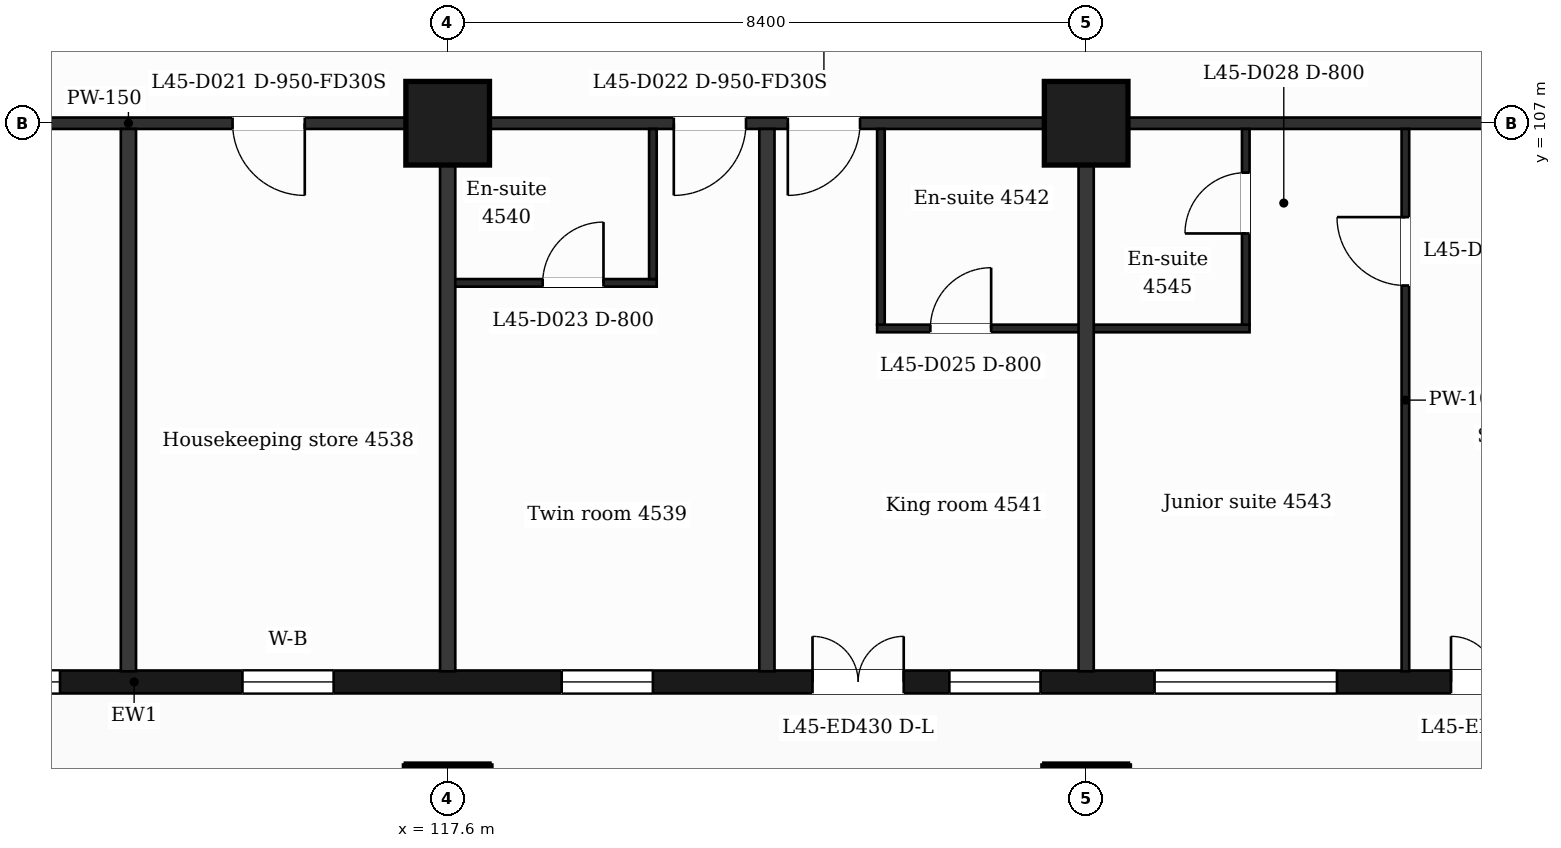
"""IFC4 building model, lengths in metres.
Left out: names, types, materials, properties, quantities, classifications, styles, units other than length and angle.
Written with IfcOpenShell. Run it as: python <this file> out.ifc"""

import sys

from ifc_helpers import new_model, si_unit, direction, frame, frame_2d, origin, origin_2d, place, context, subcontext, project, spatial, rectangle, extrude, element, fill, save


model = new_model("IFC4")
c1 = context("Model", 3, precision=1e-05, world=origin(), true_north=direction((0.0, 1.0)))
c2 = subcontext(c1, "Body", "Model", "MODEL_VIEW")
j1 = project(units=[si_unit("LENGTHUNIT", "METRE"), si_unit("PLANEANGLEUNIT", "RADIAN")], contexts=[c1])
p1 = place(None, origin())
s1 = spatial("IfcSite", under=j1, at=p1, CompositionType="ELEMENT")
p2 = place(p1, origin())
s2 = spatial("IfcBuilding", under=s1, at=p2, CompositionType="ELEMENT")
p3 = place(p2, frame((0.0, 0.0, 188.5)))
s3 = spatial("IfcBuildingStorey", under=s2, at=p3, CompositionType="ELEMENT", Elevation=188.5)
for number, where, z_axis, x_axis in (
    (1, (117.6, 98.0, 0.0), (0.0, 0.0, 1.0), (1.0, 0.0, 0.0)),
    (2, (126.0, 98.0, 0.0), (0.0, 0.0, 1.0), (1.0, 0.0, 0.0)),
    (3, (117.6, 107.0, 0.0), (0.0, 0.0, 1.0), (1.0, 0.0, 0.0)),
    (4, (126.0, 107.0, 0.0), (0.0, 0.0, 1.0), (1.0, 0.0, 0.0)),
):
    element("IfcColumn", number, at=place(p3, frame(where, z_axis=z_axis, x_axis=x_axis)), inside=s3, PredefinedType="COLUMN", context=c2, shape_type="SweptSolid", body=[
        extrude(rectangle(XDim=1.1, YDim=1.1, at=origin_2d()), origin(), (0.0, 0.0, 1.0), 3.7),
    ])
p4 = place(p3, frame((89.85, 99.65, 0.0), z_axis=(0.0, 0.0, 1.0), x_axis=(1.0, 0.0, 0.0)))
e5 = element("IfcWall", 5, at=p4, inside=s3, PredefinedType="SOLIDWALL", context=c2, shape_type="SweptSolid", body=[
    extrude(rectangle(XDim=47.25, YDim=0.3, at=frame_2d((23.625, 0.0))), origin(), (0.0, 0.0, 1.0), 3.25),
])
p5 = place(p4, frame((0.725, 0.0, 0.9)))
e6 = element("IfcOpeningElement", 6, at=p5, cuts=e5, PredefinedType="OPENING", context=c2, shape_type="SweptSolid", body=[
    extrude(rectangle(XDim=1.2, YDim=2.1, at=frame_2d((0.6, 1.05))), frame((0.0, 0.16, 0.0), z_axis=(0.0, -1.0, 0.0), x_axis=(1.0, 0.0, 0.0)), (0.0, 0.0, 1.0), 0.32),
])
p6 = place(p4, frame((3.45, 0.0, 0.9)))
e7 = element("IfcOpeningElement", 7, at=p6, cuts=e5, PredefinedType="OPENING", context=c2, shape_type="SweptSolid", body=[
    extrude(rectangle(XDim=2.4, YDim=2.1, at=frame_2d((1.2, 1.05))), frame((0.0, 0.16, 0.0), z_axis=(0.0, -1.0, 0.0), x_axis=(1.0, 0.0, 0.0)), (0.0, 0.0, 1.0), 0.32),
])
p7 = place(p4, frame((7.65, 0.0, 0.9)))
e8 = element("IfcOpeningElement", 8, at=p7, cuts=e5, PredefinedType="OPENING", context=c2, shape_type="SweptSolid", body=[
    extrude(rectangle(XDim=2.4, YDim=2.1, at=frame_2d((1.2, 1.05))), frame((0.0, 0.16, 0.0), z_axis=(0.0, -1.0, 0.0), x_axis=(1.0, 0.0, 0.0)), (0.0, 0.0, 1.0), 0.32),
])
p8 = place(p4, frame((11.85, 0.0, 0.9)))
e9 = element("IfcOpeningElement", 9, at=p8, cuts=e5, PredefinedType="OPENING", context=c2, shape_type="SweptSolid", body=[
    extrude(rectangle(XDim=2.4, YDim=2.1, at=frame_2d((1.2, 1.05))), frame((0.0, 0.16, 0.0), z_axis=(0.0, -1.0, 0.0), x_axis=(1.0, 0.0, 0.0)), (0.0, 0.0, 1.0), 0.32),
])
p9 = place(p4, frame((16.05, 0.0, 0.9)))
e10 = element("IfcOpeningElement", 10, at=p9, cuts=e5, PredefinedType="OPENING", context=c2, shape_type="SweptSolid", body=[
    extrude(rectangle(XDim=2.4, YDim=2.1, at=frame_2d((1.2, 1.05))), frame((0.0, 0.16, 0.0), z_axis=(0.0, -1.0, 0.0), x_axis=(1.0, 0.0, 0.0)), (0.0, 0.0, 1.0), 0.32),
])
p10 = place(p4, frame((20.25, 0.0, 0.9)))
e11 = element("IfcOpeningElement", 11, at=p10, cuts=e5, PredefinedType="OPENING", context=c2, shape_type="SweptSolid", body=[
    extrude(rectangle(XDim=2.4, YDim=2.1, at=frame_2d((1.2, 1.05))), frame((0.0, 0.16, 0.0), z_axis=(0.0, -1.0, 0.0), x_axis=(1.0, 0.0, 0.0)), (0.0, 0.0, 1.0), 0.32),
])
p11 = place(p4, frame((25.05, 0.0, 0.9)))
e12 = element("IfcOpeningElement", 12, at=p11, cuts=e5, PredefinedType="OPENING", context=c2, shape_type="SweptSolid", body=[
    extrude(rectangle(XDim=1.2, YDim=2.1, at=frame_2d((0.6, 1.05))), frame((0.0, 0.16, 0.0), z_axis=(0.0, -1.0, 0.0), x_axis=(1.0, 0.0, 0.0)), (0.0, 0.0, 1.0), 0.32),
])
p12 = place(p4, frame((29.25, 0.0, 0.9)))
e13 = element("IfcOpeningElement", 13, at=p12, cuts=e5, PredefinedType="OPENING", context=c2, shape_type="SweptSolid", body=[
    extrude(rectangle(XDim=1.2, YDim=2.1, at=frame_2d((0.6, 1.05))), frame((0.0, 0.16, 0.0), z_axis=(0.0, -1.0, 0.0), x_axis=(1.0, 0.0, 0.0)), (0.0, 0.0, 1.0), 0.32),
])
p13 = place(p4, frame((32.55, 0.0, 0.0)))
e14 = element("IfcOpeningElement", 14, at=p13, cuts=e5, PredefinedType="OPENING", context=c2, shape_type="SweptSolid", body=[
    extrude(rectangle(XDim=1.2, YDim=2.4, at=frame_2d((0.6, 1.2))), frame((0.0, 0.16, 0.0), z_axis=(0.0, -1.0, 0.0), x_axis=(1.0, 0.0, 0.0)), (0.0, 0.0, 1.0), 0.32),
])
p14 = place(p4, frame((34.35, 0.0, 0.9)))
e15 = element("IfcOpeningElement", 15, at=p14, cuts=e5, PredefinedType="OPENING", context=c2, shape_type="SweptSolid", body=[
    extrude(rectangle(XDim=1.2, YDim=2.1, at=frame_2d((0.6, 1.05))), frame((0.0, 0.16, 0.0), z_axis=(0.0, -1.0, 0.0), x_axis=(1.0, 0.0, 0.0)), (0.0, 0.0, 1.0), 0.32),
])
p15 = place(p4, frame((37.05, 0.0, 0.9)))
e16 = element("IfcOpeningElement", 16, at=p15, cuts=e5, PredefinedType="OPENING", context=c2, shape_type="SweptSolid", body=[
    extrude(rectangle(XDim=2.4, YDim=2.1, at=frame_2d((1.2, 1.05))), frame((0.0, 0.16, 0.0), z_axis=(0.0, -1.0, 0.0), x_axis=(1.0, 0.0, 0.0)), (0.0, 0.0, 1.0), 0.32),
])
p16 = place(p4, frame((40.95, 0.0, 0.0)))
e17 = element("IfcOpeningElement", 17, at=p16, cuts=e5, PredefinedType="OPENING", context=c2, shape_type="SweptSolid", body=[
    extrude(rectangle(XDim=1.2, YDim=2.4, at=frame_2d((0.6, 1.2))), frame((0.0, 0.16, 0.0), z_axis=(0.0, -1.0, 0.0), x_axis=(1.0, 0.0, 0.0)), (0.0, 0.0, 1.0), 0.32),
])
p17 = place(p4, frame((42.75, 0.0, 0.9)))
e18 = element("IfcOpeningElement", 18, at=p17, cuts=e5, PredefinedType="OPENING", context=c2, shape_type="SweptSolid", body=[
    extrude(rectangle(XDim=1.2, YDim=2.1, at=frame_2d((0.6, 1.05))), frame((0.0, 0.16, 0.0), z_axis=(0.0, -1.0, 0.0), x_axis=(1.0, 0.0, 0.0)), (0.0, 0.0, 1.0), 0.32),
])
p18 = place(p4, frame((45.25, 0.0, 0.9)))
e19 = element("IfcOpeningElement", 19, at=p18, cuts=e5, PredefinedType="OPENING", context=c2, shape_type="SweptSolid", body=[
    extrude(rectangle(XDim=1.2, YDim=2.1, at=frame_2d((0.6, 1.05))), frame((0.0, 0.16, 0.0), z_axis=(0.0, -1.0, 0.0), x_axis=(1.0, 0.0, 0.0)), (0.0, 0.0, 1.0), 0.32),
])
p19 = place(p3, frame((123.25, 104.3, 0.0), z_axis=(0.0, 0.0, 1.0), x_axis=(1.0, 0.0, 0.0)))
e20 = element("IfcWall", 20, at=p19, inside=s3, PredefinedType="PARTITIONING", context=c2, shape_type="SweptSolid", body=[
    extrude(rectangle(XDim=4.9, YDim=0.1, at=frame_2d((2.45, 0.0))), origin(), (0.0, 0.0, 1.0), 3.25),
])
p20 = place(p19, frame((0.7, 0.0, 0.0)))
e21 = element("IfcOpeningElement", 21, at=p20, cuts=e20, PredefinedType="OPENING", context=c2, shape_type="SweptSolid", body=[
    extrude(rectangle(XDim=0.8, YDim=2.1, at=frame_2d((0.4, 1.05))), frame((0.0, 0.06, 0.0), z_axis=(0.0, -1.0, 0.0), x_axis=(1.0, 0.0, 0.0)), (0.0, 0.0, 1.0), 0.12),
])
p21 = place(p3, frame((117.6, 104.9, 0.0), z_axis=(0.0, 0.0, 1.0), x_axis=(1.0, 0.0, 0.0)))
e22 = element("IfcWall", 22, at=p21, inside=s3, PredefinedType="PARTITIONING", context=c2, shape_type="SweptSolid", body=[
    extrude(rectangle(XDim=2.75, YDim=0.1, at=frame_2d((1.375, 0.0))), origin(), (0.0, 0.0, 1.0), 3.25),
])
p22 = place(p21, frame((1.25, 0.0, 0.0)))
e23 = element("IfcOpeningElement", 23, at=p22, cuts=e22, PredefinedType="OPENING", context=c2, shape_type="SweptSolid", body=[
    extrude(rectangle(XDim=0.8, YDim=2.1, at=frame_2d((0.4, 1.05))), frame((0.0, 0.06, 0.0), z_axis=(0.0, -1.0, 0.0), x_axis=(1.0, 0.0, 0.0)), (0.0, 0.0, 1.0), 0.12),
])
p23 = place(p3, frame((87.018, 107.0, 0.0), z_axis=(0.0, 0.0, 1.0), x_axis=(1.0, 0.0, 0.0)))
e24 = element("IfcWall", 24, at=p23, inside=s3, PredefinedType="PARTITIONING", context=c2, shape_type="SweptSolid", body=[
    extrude(rectangle(XDim=52.765, YDim=0.15, at=frame_2d((26.382, 0.0))), origin(), (0.0, 0.0, 1.0), 3.25),
])
p24 = place(p23, frame((0.87, 0.0, 0.0)))
e25 = element("IfcOpeningElement", 25, at=p24, cuts=e24, PredefinedType="OPENING", context=c2, shape_type="SweptSolid", body=[
    extrude(rectangle(XDim=0.95, YDim=2.1, at=frame_2d((0.475, 1.05))), frame((0.0, 0.085, 0.0), z_axis=(0.0, -1.0, 0.0), x_axis=(1.0, 0.0, 0.0)), (0.0, 0.0, 1.0), 0.17),
])
p25 = place(p23, frame((10.757, 0.0, 0.0)))
e26 = element("IfcOpeningElement", 26, at=p25, cuts=e24, PredefinedType="OPENING", context=c2, shape_type="SweptSolid", body=[
    extrude(rectangle(XDim=1.0, YDim=2.1, at=frame_2d((0.5, 1.05))), frame((0.0, 0.085, 0.0), z_axis=(0.0, -1.0, 0.0), x_axis=(1.0, 0.0, 0.0)), (0.0, 0.0, 1.0), 0.17),
])
p26 = place(p23, frame((20.432, 0.0, 0.0)))
e27 = element("IfcOpeningElement", 27, at=p26, cuts=e24, PredefinedType="OPENING", context=c2, shape_type="SweptSolid", body=[
    extrude(rectangle(XDim=0.95, YDim=2.1, at=frame_2d((0.475, 1.05))), frame((0.0, 0.085, 0.0), z_axis=(0.0, -1.0, 0.0), x_axis=(1.0, 0.0, 0.0)), (0.0, 0.0, 1.0), 0.17),
])
p27 = place(p23, frame((27.752, 0.0, 0.0)))
e28 = element("IfcOpeningElement", 28, at=p27, cuts=e24, PredefinedType="OPENING", context=c2, shape_type="SweptSolid", body=[
    extrude(rectangle(XDim=0.95, YDim=2.1, at=frame_2d((0.475, 1.05))), frame((0.0, 0.085, 0.0), z_axis=(0.0, -1.0, 0.0), x_axis=(1.0, 0.0, 0.0)), (0.0, 0.0, 1.0), 0.17),
])
p28 = place(p23, frame((33.557, 0.0, 0.0)))
e29 = element("IfcOpeningElement", 29, at=p28, cuts=e24, PredefinedType="OPENING", context=c2, shape_type="SweptSolid", body=[
    extrude(rectangle(XDim=0.95, YDim=2.1, at=frame_2d((0.475, 1.05))), frame((0.0, 0.085, 0.0), z_axis=(0.0, -1.0, 0.0), x_axis=(1.0, 0.0, 0.0)), (0.0, 0.0, 1.0), 0.17),
])
p29 = place(p23, frame((35.057, 0.0, 0.0)))
e30 = element("IfcOpeningElement", 30, at=p29, cuts=e24, PredefinedType="OPENING", context=c2, shape_type="SweptSolid", body=[
    extrude(rectangle(XDim=0.95, YDim=2.1, at=frame_2d((0.475, 1.05))), frame((0.0, 0.085, 0.0), z_axis=(0.0, -1.0, 0.0), x_axis=(1.0, 0.0, 0.0)), (0.0, 0.0, 1.0), 0.17),
])
p30 = place(p23, frame((45.407, 0.0, 0.0)))
e31 = element("IfcOpeningElement", 31, at=p30, cuts=e24, PredefinedType="OPENING", context=c2, shape_type="SweptSolid", body=[
    extrude(rectangle(XDim=1.0, YDim=2.1, at=frame_2d((0.5, 1.05))), frame((0.0, 0.085, 0.0), z_axis=(0.0, -1.0, 0.0), x_axis=(1.0, 0.0, 0.0)), (0.0, 0.0, 1.0), 0.17),
])
p31 = place(p23, frame((49.285, 0.0, 0.0)))
e32 = element("IfcOpeningElement", 32, at=p31, cuts=e24, PredefinedType="OPENING", context=c2, shape_type="SweptSolid", body=[
    extrude(rectangle(XDim=0.95, YDim=2.1, at=frame_2d((0.475, 1.05))), frame((0.0, 0.085, 0.0), z_axis=(0.0, -1.0, 0.0), x_axis=(1.0, 0.0, 0.0)), (0.0, 0.0, 1.0), 0.17),
])
for number, where, z_axis, x_axis in (
    (33, (113.4, 99.79, 0.0), (0.0, 0.0, 1.0), (0.0, 1.0, 0.0)),
    (34, (117.6, 99.79, 0.0), (0.0, 0.0, 1.0), (0.0, 1.0, 0.0)),
):
    element("IfcWall", number, at=place(p3, frame(where, z_axis=z_axis, x_axis=x_axis)), inside=s3, PredefinedType="PARTITIONING", context=c2, shape_type="SweptSolid", body=[
        extrude(rectangle(XDim=7.135, YDim=0.2, at=frame_2d((3.567, 0.0))), origin(), (0.0, 0.0, 1.0), 3.25),
    ])
p32 = place(p3, frame((120.3, 104.95, 0.0), z_axis=(0.0, 0.0, 1.0), x_axis=(0.0, 1.0, 0.0)))
e35 = element("IfcWall", 35, at=p32, inside=s3, PredefinedType="PARTITIONING", context=c2, shape_type="SweptSolid", body=[
    extrude(rectangle(XDim=1.975, YDim=0.1, at=frame_2d((0.988, 0.0))), origin(), (0.0, 0.0, 1.0), 3.25),
])
p33 = place(p3, frame((121.8, 99.79, 0.0), z_axis=(0.0, 0.0, 1.0), x_axis=(0.0, 1.0, 0.0)))
e36 = element("IfcWall", 36, at=p33, inside=s3, PredefinedType="PARTITIONING", context=c2, shape_type="SweptSolid", body=[
    extrude(rectangle(XDim=7.135, YDim=0.2, at=frame_2d((3.567, 0.0))), origin(), (0.0, 0.0, 1.0), 3.25),
])
p34 = place(p3, frame((123.3, 104.35, 0.0), z_axis=(0.0, 0.0, 1.0), x_axis=(0.0, 1.0, 0.0)))
e37 = element("IfcWall", 37, at=p34, inside=s3, PredefinedType="PARTITIONING", context=c2, shape_type="SweptSolid", body=[
    extrude(rectangle(XDim=2.575, YDim=0.1, at=frame_2d((1.288, 0.0))), origin(), (0.0, 0.0, 1.0), 3.25),
])
p35 = place(p3, frame((126.0, 99.79, 0.0), z_axis=(0.0, 0.0, 1.0), x_axis=(0.0, 1.0, 0.0)))
e38 = element("IfcWall", 38, at=p35, inside=s3, PredefinedType="PARTITIONING", context=c2, shape_type="SweptSolid", body=[
    extrude(rectangle(XDim=7.135, YDim=0.2, at=frame_2d((3.567, 0.0))), origin(), (0.0, 0.0, 1.0), 3.25),
])
p36 = place(p3, frame((128.1, 104.35, 0.0), z_axis=(0.0, 0.0, 1.0), x_axis=(0.0, 1.0, 0.0)))
e39 = element("IfcWall", 39, at=p36, inside=s3, PredefinedType="PARTITIONING", context=c2, shape_type="SweptSolid", body=[
    extrude(rectangle(XDim=2.575, YDim=0.1, at=frame_2d((1.288, 0.0))), origin(), (0.0, 0.0, 1.0), 3.25),
])
p37 = place(p36, frame((1.2, 0.0, 0.0)))
e40 = element("IfcOpeningElement", 40, at=p37, cuts=e39, PredefinedType="OPENING", context=c2, shape_type="SweptSolid", body=[
    extrude(rectangle(XDim=0.8, YDim=2.1, at=frame_2d((0.4, 1.05))), frame((0.0, 0.06, 0.0), z_axis=(0.0, -1.0, 0.0), x_axis=(1.0, 0.0, 0.0)), (0.0, 0.0, 1.0), 0.12),
])
p38 = place(p3, frame((130.2, 99.79, 0.0), z_axis=(0.0, 0.0, 1.0), x_axis=(0.0, 1.0, 0.0)))
e41 = element("IfcWall", 41, at=p38, inside=s3, PredefinedType="PARTITIONING", context=c2, shape_type="SweptSolid", body=[
    extrude(rectangle(XDim=7.135, YDim=0.1, at=frame_2d((3.567, 0.0))), origin(), (0.0, 0.0, 1.0), 3.25),
])
p39 = place(p38, frame((5.075, 0.0, 0.0)))
e42 = element("IfcOpeningElement", 42, at=p39, cuts=e41, PredefinedType="OPENING", context=c2, shape_type="SweptSolid", body=[
    extrude(rectangle(XDim=0.9, YDim=2.1, at=frame_2d((0.45, 1.05))), frame((0.0, 0.06, 0.0), z_axis=(0.0, -1.0, 0.0), x_axis=(1.0, 0.0, 0.0)), (0.0, 0.0, 1.0), 0.12),
])
p40 = place(p10, origin())
e43 = element("IfcWindow", 43, at=p40, inside=s3, PartitioningType="SINGLE_PANEL", PredefinedType="WINDOW", context=c2, shape_type="SweptSolid", body=[
    extrude(rectangle(XDim=2.4, YDim=2.1, at=frame_2d((1.2, 1.05))), frame((0.0, 0.03, 0.0), z_axis=(0.0, -1.0, 0.0), x_axis=(1.0, 0.0, 0.0)), (0.0, 0.0, 1.0), 0.06),
])
fill(e11, e43)
p41 = place(p11, origin())
e44 = element("IfcWindow", 44, at=p41, inside=s3, PartitioningType="SINGLE_PANEL", PredefinedType="WINDOW", context=c2, shape_type="SweptSolid", body=[
    extrude(rectangle(XDim=1.2, YDim=2.1, at=frame_2d((0.6, 1.05))), frame((0.0, 0.03, 0.0), z_axis=(0.0, -1.0, 0.0), x_axis=(1.0, 0.0, 0.0)), (0.0, 0.0, 1.0), 0.06),
])
fill(e12, e44)
p42 = place(p12, origin())
e45 = element("IfcWindow", 45, at=p42, inside=s3, PartitioningType="SINGLE_PANEL", PredefinedType="WINDOW", context=c2, shape_type="SweptSolid", body=[
    extrude(rectangle(XDim=1.2, YDim=2.1, at=frame_2d((0.6, 1.05))), frame((0.0, 0.03, 0.0), z_axis=(0.0, -1.0, 0.0), x_axis=(1.0, 0.0, 0.0)), (0.0, 0.0, 1.0), 0.06),
])
fill(e13, e45)
p43 = place(p13, origin())
e46 = element("IfcDoor", 46, at=p43, inside=s3, OperationType="DOUBLE_DOOR_SINGLE_SWING", PredefinedType="DOOR", context=c2, shape_type="SweptSolid", body=[
    extrude(rectangle(XDim=1.2, YDim=2.4, at=frame_2d((0.6, 1.2))), frame((0.0, 0.025, 0.0), z_axis=(0.0, -1.0, 0.0), x_axis=(1.0, 0.0, 0.0)), (0.0, 0.0, 1.0), 0.05),
])
fill(e14, e46)
p44 = place(p14, origin())
e47 = element("IfcWindow", 47, at=p44, inside=s3, PartitioningType="SINGLE_PANEL", PredefinedType="WINDOW", context=c2, shape_type="SweptSolid", body=[
    extrude(rectangle(XDim=1.2, YDim=2.1, at=frame_2d((0.6, 1.05))), frame((0.0, 0.03, 0.0), z_axis=(0.0, -1.0, 0.0), x_axis=(1.0, 0.0, 0.0)), (0.0, 0.0, 1.0), 0.06),
])
fill(e15, e47)
p45 = place(p15, origin())
e48 = element("IfcWindow", 48, at=p45, inside=s3, PartitioningType="SINGLE_PANEL", PredefinedType="WINDOW", context=c2, shape_type="SweptSolid", body=[
    extrude(rectangle(XDim=2.4, YDim=2.1, at=frame_2d((1.2, 1.05))), frame((0.0, 0.03, 0.0), z_axis=(0.0, -1.0, 0.0), x_axis=(1.0, 0.0, 0.0)), (0.0, 0.0, 1.0), 0.06),
])
fill(e16, e48)
p46 = place(p16, origin())
e49 = element("IfcDoor", 49, at=p46, inside=s3, OperationType="DOUBLE_DOOR_SINGLE_SWING", PredefinedType="DOOR", context=c2, shape_type="SweptSolid", body=[
    extrude(rectangle(XDim=1.2, YDim=2.4, at=frame_2d((0.6, 1.2))), frame((0.0, 0.025, 0.0), z_axis=(0.0, -1.0, 0.0), x_axis=(1.0, 0.0, 0.0)), (0.0, 0.0, 1.0), 0.05),
])
fill(e17, e49)
p47 = place(p27, origin())
e50 = element("IfcDoor", 50, at=p47, inside=s3, OperationType="SINGLE_SWING_RIGHT", PredefinedType="DOOR", context=c2, shape_type="SweptSolid", body=[
    extrude(rectangle(XDim=0.95, YDim=2.1, at=frame_2d((0.475, 1.05))), frame((0.0, 0.025, 0.0), z_axis=(0.0, -1.0, 0.0), x_axis=(1.0, 0.0, 0.0)), (0.0, 0.0, 1.0), 0.05),
])
fill(e28, e50)
p48 = place(p28, origin())
e51 = element("IfcDoor", 51, at=p48, inside=s3, OperationType="SINGLE_SWING_LEFT", PredefinedType="DOOR", context=c2, shape_type="SweptSolid", body=[
    extrude(rectangle(XDim=0.95, YDim=2.1, at=frame_2d((0.475, 1.05))), frame((0.0, 0.025, 0.0), z_axis=(0.0, -1.0, 0.0), x_axis=(1.0, 0.0, 0.0)), (0.0, 0.0, 1.0), 0.05),
])
fill(e29, e51)
p49 = place(p22, origin())
e52 = element("IfcDoor", 52, at=p49, inside=s3, OperationType="SINGLE_SWING_RIGHT", PredefinedType="DOOR", context=c2, shape_type="SweptSolid", body=[
    extrude(rectangle(XDim=0.8, YDim=2.1, at=frame_2d((0.4, 1.05))), frame((0.0, 0.025, 0.0), z_axis=(0.0, -1.0, 0.0), x_axis=(1.0, 0.0, 0.0)), (0.0, 0.0, 1.0), 0.05),
])
fill(e23, e52)
p50 = place(p29, origin())
e53 = element("IfcDoor", 53, at=p50, inside=s3, OperationType="SINGLE_SWING_LEFT", PredefinedType="DOOR", context=c2, shape_type="SweptSolid", body=[
    extrude(rectangle(XDim=0.95, YDim=2.1, at=frame_2d((0.475, 1.05))), frame((0.0, 0.025, 0.0), z_axis=(0.0, -1.0, 0.0), x_axis=(1.0, 0.0, 0.0)), (0.0, 0.0, 1.0), 0.05),
])
fill(e30, e53)
p51 = place(p20, origin())
e54 = element("IfcDoor", 54, at=p51, inside=s3, OperationType="SINGLE_SWING_RIGHT", PredefinedType="DOOR", context=c2, shape_type="SweptSolid", body=[
    extrude(rectangle(XDim=0.8, YDim=2.1, at=frame_2d((0.4, 1.05))), frame((0.0, 0.025, 0.0), z_axis=(0.0, -1.0, 0.0), x_axis=(1.0, 0.0, 0.0)), (0.0, 0.0, 1.0), 0.05),
])
fill(e21, e54)
p52 = place(p39, origin())
e55 = element("IfcDoor", 55, at=p52, inside=s3, OperationType="SINGLE_SWING_RIGHT", PredefinedType="DOOR", context=c2, shape_type="SweptSolid", body=[
    extrude(rectangle(XDim=0.9, YDim=2.1, at=frame_2d((0.45, 1.05))), frame((0.0, 0.025, 0.0), z_axis=(0.0, -1.0, 0.0), x_axis=(1.0, 0.0, 0.0)), (0.0, 0.0, 1.0), 0.05),
])
fill(e42, e55)
p53 = place(p37, origin())
e56 = element("IfcDoor", 56, at=p53, inside=s3, OperationType="SINGLE_SWING_LEFT", PredefinedType="DOOR", context=c2, shape_type="SweptSolid", body=[
    extrude(rectangle(XDim=0.8, YDim=2.1, at=frame_2d((0.4, 1.05))), frame((0.0, 0.025, 0.0), z_axis=(0.0, -1.0, 0.0), x_axis=(1.0, 0.0, 0.0)), (0.0, 0.0, 1.0), 0.05),
])
fill(e40, e56)
save(model, sys.argv[1])
